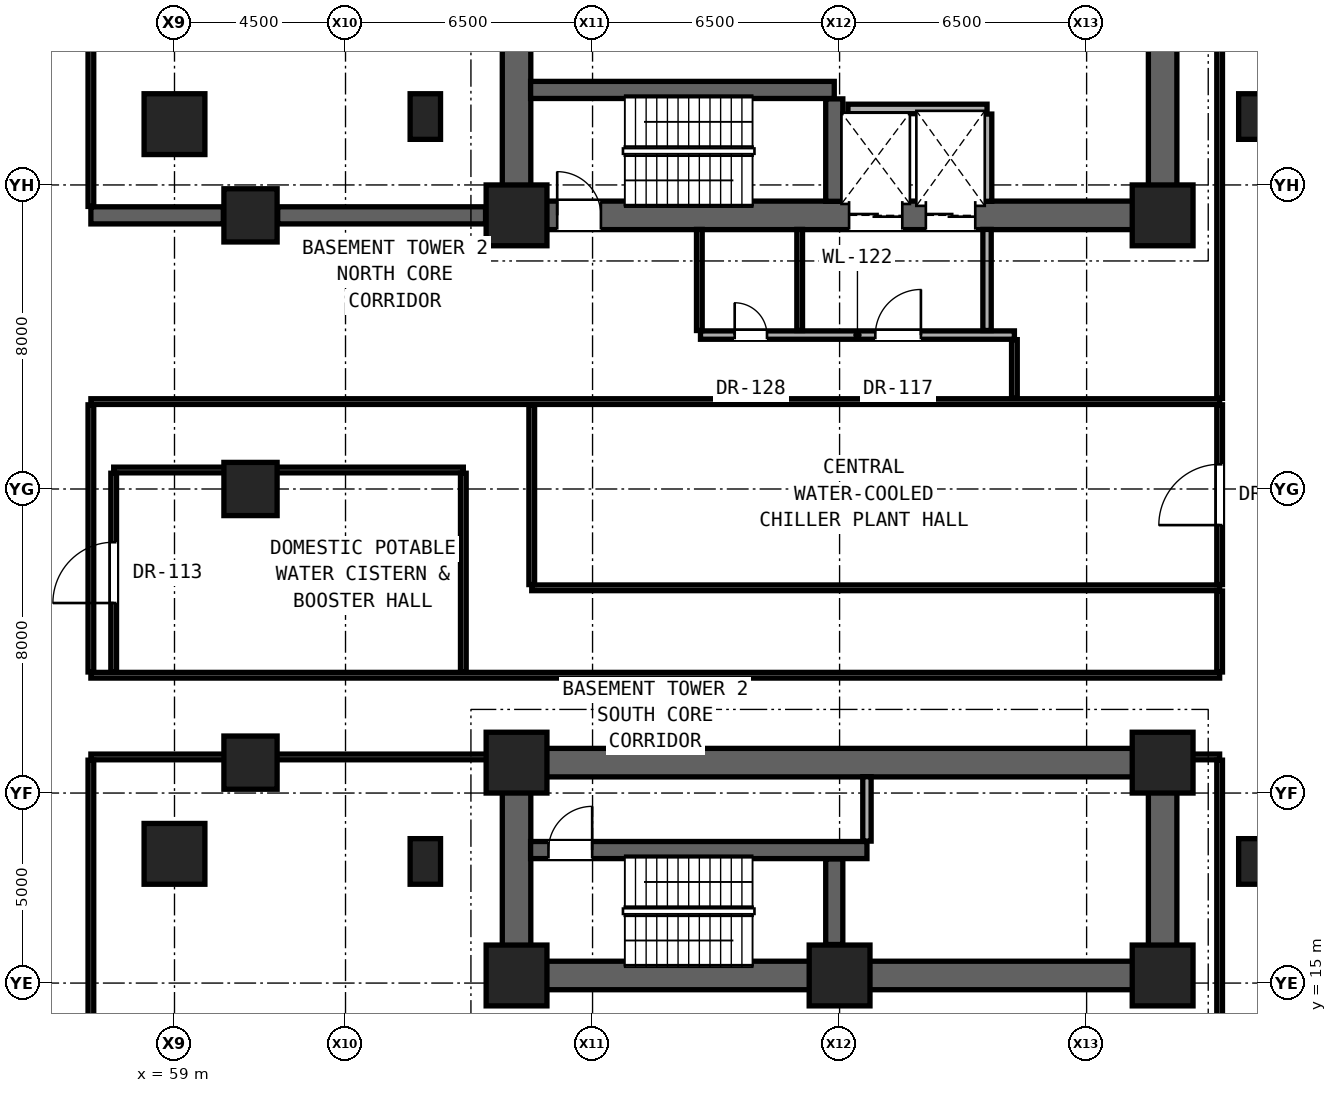
"""IFC4 building model, lengths in metres.
Left out: names, types, materials, properties, quantities, classifications, styles, units other than length and angle.
Written with IfcOpenShell. Run it as: python <this file> out.ifc"""

import sys

from ifc_helpers import new_model, si_unit, direction, frame, frame_2d, origin, origin_2d, place, context, subcontext, project, spatial, rectangle, hollow_rectangle, extrude, element, fill, save


model = new_model("IFC4")
c1 = context("Model", 3, precision=1e-05, world=origin(), true_north=direction((0.0, 1.0)))
c2 = subcontext(c1, "Body", "Model", "MODEL_VIEW")
j1 = project(units=[si_unit("LENGTHUNIT", "METRE"), si_unit("PLANEANGLEUNIT", "RADIAN")], contexts=[c1])
p1 = place(None, origin())
s1 = spatial("IfcSite", under=j1, at=p1, CompositionType="ELEMENT")
p2 = place(p1, origin())
s2 = spatial("IfcBuilding", under=s1, at=p2, CompositionType="ELEMENT")
p3 = place(p2, frame((0.0, 0.0, -4.8)))
s3 = spatial("IfcBuildingStorey", under=s2, at=p3, CompositionType="ELEMENT", Elevation=-4.8)
for number, where, z_axis, x_axis in (
    (1, (68.0, 15.2, 0.0), (0.0, 0.0, 1.0), (1.0, 0.0, 0.0)),
    (2, (76.5, 15.2, 0.0), (0.0, 0.0, 1.0), (1.0, 0.0, 0.0)),
    (3, (85.0, 15.2, 0.0), (0.0, 0.0, 1.0), (1.0, 0.0, 0.0)),
    (4, (68.0, 20.8, 0.0), (0.0, 0.0, 1.0), (1.0, 0.0, 0.0)),
    (5, (85.0, 20.8, 0.0), (0.0, 0.0, 1.0), (1.0, 0.0, 0.0)),
    (6, (68.0, 35.2, 0.0), (0.0, 0.0, 1.0), (1.0, 0.0, 0.0)),
    (7, (85.0, 35.2, 0.0), (0.0, 0.0, 1.0), (1.0, 0.0, 0.0)),
):
    element("IfcColumn", number, at=place(p3, frame(where, z_axis=z_axis, x_axis=x_axis)), inside=s3, PredefinedType="COLUMN", context=c2, shape_type="SweptSolid", body=[
        extrude(rectangle(XDim=1.6, YDim=1.6, at=origin_2d()), origin(), (0.0, 0.0, 1.0), 4.8),
    ])
for number, where, z_axis, x_axis in (
    (8, (61.0, 20.8, 0.0), (0.0, 0.0, 1.0), (1.0, 0.0, 0.0)),
    (9, (61.0, 28.0, 0.0), (0.0, 0.0, 1.0), (1.0, 0.0, 0.0)),
    (10, (61.0, 35.2, 0.0), (0.0, 0.0, 1.0), (1.0, 0.0, 0.0)),
):
    element("IfcColumn", number, at=place(p3, frame(where, z_axis=z_axis, x_axis=x_axis)), inside=s3, PredefinedType="COLUMN", context=c2, shape_type="SweptSolid", body=[
        extrude(hollow_rectangle(XDim=1.4, YDim=1.4, WallThickness=0.08, at=origin_2d()), origin(), (0.0, 0.0, 1.0), 4.8),
    ])
for number, where, z_axis, x_axis in (
    (11, (65.6, 18.2, 0.0), (0.0, 0.0, 1.0), (1.0, 0.0, 0.0)),
    (12, (87.4, 18.2, 0.0), (0.0, 0.0, 1.0), (1.0, 0.0, 0.0)),
    (13, (65.6, 37.8, 0.0), (0.0, 0.0, 1.0), (1.0, 0.0, 0.0)),
    (14, (87.4, 37.8, 0.0), (0.0, 0.0, 1.0), (1.0, 0.0, 0.0)),
):
    element("IfcColumn", number, at=place(p3, frame(where, z_axis=z_axis, x_axis=x_axis)), inside=s3, PredefinedType="PILASTER", context=c2, shape_type="SweptSolid", body=[
        extrude(rectangle(XDim=0.8, YDim=1.2, at=origin_2d()), origin(), (0.0, 0.0, 1.0), 4.8),
    ])
for number, where, z_axis, x_axis in (
    (15, (68.0, 35.2, 0.0), (0.0, 0.0, 1.0), (0.0, 1.0, 0.0)),
    (16, (85.0, 35.2, 0.0), (0.0, 0.0, 1.0), (0.0, 1.0, 0.0)),
):
    element("IfcWall", number, at=place(p3, frame(where, z_axis=z_axis, x_axis=x_axis)), inside=s3, PredefinedType="SHEAR", context=c2, shape_type="SweptSolid", body=[
        extrude(rectangle(XDim=5.6, YDim=0.75, at=frame_2d((2.8, 0.0))), origin(), (0.0, 0.0, 1.0), 4.48),
    ])
p4 = place(p3, frame((68.0, 35.2, 0.0), z_axis=(0.0, 0.0, 1.0), x_axis=(1.0, 0.0, 0.0)))
e17 = element("IfcWall", 17, at=p4, inside=s3, PredefinedType="SHEAR", context=c2, shape_type="SweptSolid", body=[
    extrude(rectangle(XDim=17.0, YDim=0.75, at=frame_2d((8.5, 0.0))), origin(), (0.0, 0.0, 1.0), 4.48),
])
p5 = place(p4, frame((1.07, 0.0, 0.0)))
e18 = element("IfcOpeningElement", 18, at=p5, cuts=e17, PredefinedType="OPENING", context=c2, shape_type="SweptSolid", body=[
    extrude(rectangle(XDim=1.15, YDim=2.2, at=frame_2d((0.575, 1.1))), frame((0.0, 0.385, 0.0), z_axis=(0.0, -1.0, 0.0), x_axis=(1.0, 0.0, 0.0)), (0.0, 0.0, 1.0), 0.77),
])
p6 = place(p4, frame((8.75, 0.0, 0.0)))
e19 = element("IfcOpeningElement", 19, at=p6, cuts=e17, PredefinedType="OPENING", context=c2, shape_type="SweptSolid", body=[
    extrude(rectangle(XDim=1.4, YDim=2.35, at=frame_2d((0.7, 1.175))), frame((0.0, 0.385, 0.0), z_axis=(0.0, -1.0, 0.0), x_axis=(1.0, 0.0, 0.0)), (0.0, 0.0, 1.0), 0.77),
])
p7 = place(p4, frame((10.77, 0.0, 0.0)))
e20 = element("IfcOpeningElement", 20, at=p7, cuts=e17, PredefinedType="OPENING", context=c2, shape_type="SweptSolid", body=[
    extrude(rectangle(XDim=1.3, YDim=2.3, at=frame_2d((0.65, 1.15))), frame((0.0, 0.385, 0.0), z_axis=(0.0, -1.0, 0.0), x_axis=(1.0, 0.0, 0.0)), (0.0, 0.0, 1.0), 0.77),
])
p8 = place(p3, frame((68.0, 15.2, 0.0), z_axis=(0.0, 0.0, 1.0), x_axis=(1.0, 0.0, 0.0)))
e21 = element("IfcWall", 21, at=p8, inside=s3, PredefinedType="SHEAR", context=c2, shape_type="SweptSolid", body=[
    extrude(rectangle(XDim=17.0, YDim=0.75, at=frame_2d((8.5, 0.0))), origin(), (0.0, 0.0, 1.0), 4.48),
])
for number, where, z_axis, x_axis in (
    (22, (68.0, 15.2, 0.0), (0.0, 0.0, 1.0), (0.0, 1.0, 0.0)),
    (23, (85.0, 15.2, 0.0), (0.0, 0.0, 1.0), (0.0, 1.0, 0.0)),
):
    element("IfcWall", number, at=place(p3, frame(where, z_axis=z_axis, x_axis=x_axis)), inside=s3, PredefinedType="SHEAR", context=c2, shape_type="SweptSolid", body=[
        extrude(rectangle(XDim=5.6, YDim=0.75, at=frame_2d((2.8, 0.0))), origin(), (0.0, 0.0, 1.0), 4.48),
    ])
p9 = place(p3, frame((68.0, 20.8, 0.0), z_axis=(0.0, 0.0, 1.0), x_axis=(1.0, 0.0, 0.0)))
e24 = element("IfcWall", 24, at=p9, inside=s3, PredefinedType="SHEAR", context=c2, shape_type="SweptSolid", body=[
    extrude(rectangle(XDim=17.0, YDim=0.75, at=frame_2d((8.5, 0.0))), origin(), (0.0, 0.0, 1.0), 4.48),
])
for number, where, z_axis, x_axis in (
    (25, (59.0, 18.4, 0.0), (0.0, 0.0, 1.0), (1.0, 0.0, 0.0)),
    (26, (59.0, 37.6, 0.0), (0.0, 0.0, 1.0), (1.0, 0.0, 0.0)),
):
    element("IfcColumn", number, at=place(p3, frame(where, z_axis=z_axis, x_axis=x_axis)), inside=s3, PredefinedType="COLUMN", context=c2, shape_type="SweptSolid", body=[
        extrude(rectangle(XDim=1.6, YDim=1.6, at=origin_2d()), origin(), (0.0, 0.0, 1.0), 4.8),
    ])
p10 = place(p3, frame((68.37, 18.5, 0.0), z_axis=(0.0, 0.0, 1.0), x_axis=(1.0, 0.0, 0.0)))
e27 = element("IfcWall", 27, at=p10, inside=s3, PredefinedType="SHEAR", context=c2, shape_type="SweptSolid", body=[
    extrude(rectangle(XDim=8.85, YDim=0.45, at=frame_2d((4.425, 0.0))), origin(), (0.0, 0.0, 1.0), 4.48),
])
p11 = place(p10, frame((0.47, 0.0, 0.0)))
e28 = element("IfcOpeningElement", 28, at=p11, cuts=e27, PredefinedType="OPENING", context=c2, shape_type="SweptSolid", body=[
    extrude(rectangle(XDim=1.15, YDim=2.2, at=frame_2d((0.575, 1.1))), frame((0.0, 0.235, 0.0), z_axis=(0.0, -1.0, 0.0), x_axis=(1.0, 0.0, 0.0)), (0.0, 0.0, 1.0), 0.47),
])
p12 = place(p3, frame((56.8, 20.95, 0.0), z_axis=(0.0, 0.0, 1.0), x_axis=(1.0, 0.0, 0.0)))
e29 = element("IfcWall", 29, at=p12, inside=s3, PredefinedType="PARTITIONING", context=c2, shape_type="SweptSolid", body=[
    extrude(rectangle(XDim=10.83, YDim=0.15, at=frame_2d((5.415, 0.0))), origin(), (0.0, 0.0, 1.0), 3.252),
])
p13 = place(p3, frame((85.37, 20.95, 0.0), z_axis=(0.0, 0.0, 1.0), x_axis=(1.0, 0.0, 0.0)))
e30 = element("IfcWall", 30, at=p13, inside=s3, PredefinedType="PARTITIONING", context=c2, shape_type="SweptSolid", body=[
    extrude(rectangle(XDim=1.13, YDim=0.15, at=frame_2d((0.565, 0.0))), origin(), (0.0, 0.0, 1.0), 3.372),
])
p14 = place(p3, frame((56.8, 23.1, 0.0), z_axis=(0.0, 0.0, 1.0), x_axis=(1.0, 0.0, 0.0)))
e31 = element("IfcWall", 31, at=p14, inside=s3, PredefinedType="PARTITIONING", context=c2, shape_type="SweptSolid", body=[
    extrude(rectangle(XDim=29.7, YDim=0.15, at=frame_2d((14.85, 0.0))), origin(), (0.0, 0.0, 1.0), 3.252),
])
p15 = place(p3, frame((68.4, 25.4, 0.0), z_axis=(0.0, 0.0, 1.0), x_axis=(1.0, 0.0, 0.0)))
e32 = element("IfcWall", 32, at=p15, inside=s3, PredefinedType="PARTITIONING", context=c2, shape_type="SweptSolid", body=[
    extrude(rectangle(XDim=18.1, YDim=0.15, at=frame_2d((9.05, 0.0))), origin(), (0.0, 0.0, 1.0), 3.545),
])
p16 = place(p3, frame((57.4, 28.5, 0.0), z_axis=(0.0, 0.0, 1.0), x_axis=(1.0, 0.0, 0.0)))
e33 = element("IfcWall", 33, at=p16, inside=s3, PredefinedType="PARTITIONING", context=c2, shape_type="SweptSolid", body=[
    extrude(rectangle(XDim=9.2, YDim=0.15, at=frame_2d((4.6, 0.0))), origin(), (0.0, 0.0, 1.0), 3.252),
])
p17 = place(p3, frame((56.8, 30.3, 0.0), z_axis=(0.0, 0.0, 1.0), x_axis=(1.0, 0.0, 0.0)))
e34 = element("IfcWall", 34, at=p17, inside=s3, PredefinedType="PARTITIONING", context=c2, shape_type="SweptSolid", body=[
    extrude(rectangle(XDim=29.7, YDim=0.15, at=frame_2d((14.85, 0.0))), origin(), (0.0, 0.0, 1.0), 3.252),
])
p18 = place(p3, frame((72.84, 32.05, 0.0), z_axis=(0.0, 0.0, 1.0), x_axis=(1.0, 0.0, 0.0)))
e35 = element("IfcWall", 35, at=p18, inside=s3, PredefinedType="SOLIDWALL", context=c2, shape_type="SweptSolid", body=[
    extrude(rectangle(XDim=8.26, YDim=0.22, at=frame_2d((4.13, 0.0))), origin(), (0.0, 0.0, 1.0), 4.009),
])
p19 = place(p18, frame((4.6, 0.0, 0.0)))
e36 = element("IfcOpeningElement", 36, at=p19, cuts=e35, PredefinedType="OPENING", context=c2, shape_type="SweptSolid", body=[
    extrude(rectangle(XDim=1.2, YDim=2.25, at=frame_2d((0.6, 1.125))), frame((0.0, 0.12, 0.0), z_axis=(0.0, -1.0, 0.0), x_axis=(1.0, 0.0, 0.0)), (0.0, 0.0, 1.0), 0.24),
])
p20 = place(p18, frame((0.9, 0.0, 0.0)))
e37 = element("IfcOpeningElement", 37, at=p20, cuts=e35, PredefinedType="OPENING", context=c2, shape_type="SweptSolid", body=[
    extrude(rectangle(XDim=0.85, YDim=2.01, at=frame_2d((0.425, 1.005))), frame((0.0, 0.12, 0.0), z_axis=(0.0, -1.0, 0.0), x_axis=(1.0, 0.0, 0.0)), (0.0, 0.0, 1.0), 0.24),
])
p21 = place(p3, frame((56.8, 35.2, 0.0), z_axis=(0.0, 0.0, 1.0), x_axis=(1.0, 0.0, 0.0)))
e38 = element("IfcWall", 38, at=p21, inside=s3, PredefinedType="SHEAR", context=c2, shape_type="SweptSolid", body=[
    extrude(rectangle(XDim=3.485, YDim=0.45, at=frame_2d((1.742, 0.0))), origin(), (0.0, 0.0, 1.0), 4.48),
])
p22 = place(p3, frame((61.715, 35.2, 0.0), z_axis=(0.0, 0.0, 1.0), x_axis=(1.0, 0.0, 0.0)))
e39 = element("IfcWall", 39, at=p22, inside=s3, PredefinedType="SHEAR", context=c2, shape_type="SweptSolid", body=[
    extrude(rectangle(XDim=5.47, YDim=0.45, at=frame_2d((2.735, 0.0))), origin(), (0.0, 0.0, 1.0), 4.48),
])
p23 = place(p3, frame((76.72, 38.0, 0.0), z_axis=(0.0, 0.0, 1.0), x_axis=(1.0, 0.0, 0.0)))
e40 = element("IfcWall", 40, at=p23, inside=s3, PredefinedType="SOLIDWALL", context=c2, shape_type="SweptSolid", body=[
    extrude(rectangle(XDim=3.66, YDim=0.25, at=frame_2d((1.83, 0.0))), origin(), (0.0, 0.0, 1.0), 4.3),
])
p24 = place(p3, frame((68.37, 38.5, 0.0), z_axis=(0.0, 0.0, 1.0), x_axis=(1.0, 0.0, 0.0)))
e41 = element("IfcWall", 41, at=p24, inside=s3, PredefinedType="SHEAR", context=c2, shape_type="SweptSolid", body=[
    extrude(rectangle(XDim=7.99, YDim=0.45, at=frame_2d((3.995, 0.0))), origin(), (0.0, 0.0, 1.0), 4.48),
])
p25 = place(p3, frame((56.8, 12.235, 0.0), z_axis=(0.0, 0.0, 1.0), x_axis=(0.0, 1.0, 0.0)))
e42 = element("IfcWall", 42, at=p25, inside=s3, PredefinedType="PARTITIONING", context=c2, shape_type="SweptSolid", body=[
    extrude(rectangle(XDim=8.63, YDim=0.15, at=frame_2d((4.315, 0.0))), origin(), (0.0, 0.0, 1.0), 3.252),
])
p26 = place(p3, frame((56.8, 23.185, 0.0), z_axis=(0.0, 0.0, 1.0), x_axis=(0.0, 1.0, 0.0)))
e43 = element("IfcWall", 43, at=p26, inside=s3, PredefinedType="PARTITIONING", context=c2, shape_type="SweptSolid", body=[
    extrude(rectangle(XDim=7.03, YDim=0.15, at=frame_2d((3.515, 0.0))), origin(), (0.0, 0.0, 1.0), 4.3),
])
p27 = place(p3, frame((56.8, 35.435, 0.0), z_axis=(0.0, 0.0, 1.0), x_axis=(0.0, 1.0, 0.0)))
e44 = element("IfcWall", 44, at=p27, inside=s3, PredefinedType="PARTITIONING", context=c2, shape_type="SweptSolid", body=[
    extrude(rectangle(XDim=11.615, YDim=0.15, at=frame_2d((5.808, 0.0))), origin(), (0.0, 0.0, 1.0), 3.252),
])
p28 = place(p3, frame((57.4, 23.185, 0.0), z_axis=(0.0, 0.0, 1.0), x_axis=(0.0, 1.0, 0.0)))
e45 = element("IfcWall", 45, at=p28, inside=s3, PredefinedType="PARTITIONING", context=c2, shape_type="SweptSolid", body=[
    extrude(rectangle(XDim=5.23, YDim=0.15, at=frame_2d((2.615, 0.0))), origin(), (0.0, 0.0, 1.0), 4.3),
])
p29 = place(p28, frame((1.815, 0.0, 0.0)))
e46 = element("IfcOpeningElement", 46, at=p29, cuts=e45, PredefinedType="OPENING", context=c2, shape_type="SweptSolid", body=[
    extrude(rectangle(XDim=1.6, YDim=2.3, at=frame_2d((0.8, 1.15))), frame((0.0, 0.085, 0.0), z_axis=(0.0, -1.0, 0.0), x_axis=(1.0, 0.0, 0.0)), (0.0, 0.0, 1.0), 0.17),
])
p30 = place(p3, frame((66.6, 23.185, 0.0), z_axis=(0.0, 0.0, 1.0), x_axis=(0.0, 1.0, 0.0)))
e47 = element("IfcWall", 47, at=p30, inside=s3, PredefinedType="PARTITIONING", context=c2, shape_type="SweptSolid", body=[
    extrude(rectangle(XDim=5.23, YDim=0.15, at=frame_2d((2.615, 0.0))), origin(), (0.0, 0.0, 1.0), 3.699),
])
p31 = place(p3, frame((68.4, 25.485, 0.0), z_axis=(0.0, 0.0, 1.0), x_axis=(0.0, 1.0, 0.0)))
e48 = element("IfcWall", 48, at=p31, inside=s3, PredefinedType="PARTITIONING", context=c2, shape_type="SweptSolid", body=[
    extrude(rectangle(XDim=4.73, YDim=0.15, at=frame_2d((2.365, 0.0))), origin(), (0.0, 0.0, 1.0), 3.545),
])
for number, where, z_axis, x_axis in (
    (49, (72.81, 32.17, 0.0), (0.0, 0.0, 1.0), (0.0, 1.0, 0.0)),
    (50, (75.45, 32.17, 0.0), (0.0, 0.0, 1.0), (0.0, 1.0, 0.0)),
):
    element("IfcWall", number, at=place(p3, frame(where, z_axis=z_axis, x_axis=x_axis)), inside=s3, PredefinedType="PARTITIONING", context=c2, shape_type="SweptSolid", body=[
        extrude(rectangle(XDim=2.66, YDim=0.15, at=frame_2d((1.33, 0.0))), origin(), (0.0, 0.0, 1.0), 4.3),
    ])
p32 = place(p3, frame((76.36, 16.015, 0.0), z_axis=(0.0, 0.0, 1.0), x_axis=(0.0, 1.0, 0.0)))
e51 = element("IfcWall", 51, at=p32, inside=s3, PredefinedType="SHEAR", context=c2, shape_type="SweptSolid", body=[
    extrude(rectangle(XDim=2.25, YDim=0.45, at=frame_2d((1.125, 0.0))), origin(), (0.0, 0.0, 1.0), 4.48),
])
p33 = place(p3, frame((76.36, 35.57, 0.0), z_axis=(0.0, 0.0, 1.0), x_axis=(0.0, 1.0, 0.0)))
e52 = element("IfcWall", 52, at=p33, inside=s3, PredefinedType="SHEAR", context=c2, shape_type="SweptSolid", body=[
    extrude(rectangle(XDim=2.695, YDim=0.45, at=frame_2d((1.347, 0.0))), origin(), (0.0, 0.0, 1.0), 4.48),
])
p34 = place(p3, frame((77.22, 18.735, 0.0), z_axis=(0.0, 0.0, 1.0), x_axis=(0.0, 1.0, 0.0)))
e53 = element("IfcWall", 53, at=p34, inside=s3, PredefinedType="SOLIDWALL", context=c2, shape_type="SweptSolid", body=[
    extrude(rectangle(XDim=1.695, YDim=0.22, at=frame_2d((0.847, 0.0))), origin(), (0.0, 0.0, 1.0), 4.3),
])
p35 = place(p3, frame((80.38, 32.17, 0.0), z_axis=(0.0, 0.0, 1.0), x_axis=(0.0, 1.0, 0.0)))
e54 = element("IfcWall", 54, at=p35, inside=s3, PredefinedType="SOLIDWALL", context=c2, shape_type="SweptSolid", body=[
    extrude(rectangle(XDim=2.66, YDim=0.22, at=frame_2d((1.33, 0.0))), origin(), (0.0, 0.0, 1.0), 4.3),
])
p36 = place(p3, frame((80.38, 35.57, 0.0), z_axis=(0.0, 0.0, 1.0), x_axis=(0.0, 1.0, 0.0)))
e55 = element("IfcWall", 55, at=p36, inside=s3, PredefinedType="SOLIDWALL", context=c2, shape_type="SweptSolid", body=[
    extrude(rectangle(XDim=2.295, YDim=0.25, at=frame_2d((1.147, 0.0))), origin(), (0.0, 0.0, 1.0), 4.3),
])
p37 = place(p3, frame((81.1, 30.385, 0.0), z_axis=(0.0, 0.0, 1.0), x_axis=(0.0, 1.0, 0.0)))
e56 = element("IfcWall", 56, at=p37, inside=s3, PredefinedType="PARTITIONING", context=c2, shape_type="SweptSolid", body=[
    extrude(rectangle(XDim=1.545, YDim=0.15, at=frame_2d((0.772, 0.0))), origin(), (0.0, 0.0, 1.0), 4.3),
])
p38 = place(p3, frame((86.5, 12.235, 0.0), z_axis=(0.0, 0.0, 1.0), x_axis=(0.0, 1.0, 0.0)))
e57 = element("IfcWall", 57, at=p38, inside=s3, PredefinedType="PARTITIONING", context=c2, shape_type="SweptSolid", body=[
    extrude(rectangle(XDim=8.63, YDim=0.15, at=frame_2d((4.315, 0.0))), origin(), (0.0, 0.0, 1.0), 3.372),
])
p39 = place(p3, frame((86.5, 23.185, 0.0), z_axis=(0.0, 0.0, 1.0), x_axis=(0.0, 1.0, 0.0)))
e58 = element("IfcWall", 58, at=p39, inside=s3, PredefinedType="PARTITIONING", context=c2, shape_type="SweptSolid", body=[
    extrude(rectangle(XDim=2.13, YDim=0.15, at=frame_2d((1.065, 0.0))), origin(), (0.0, 0.0, 1.0), 4.3),
])
p40 = place(p3, frame((86.5, 25.485, 0.0), z_axis=(0.0, 0.0, 1.0), x_axis=(0.0, 1.0, 0.0)))
e59 = element("IfcWall", 59, at=p40, inside=s3, PredefinedType="PARTITIONING", context=c2, shape_type="SweptSolid", body=[
    extrude(rectangle(XDim=4.73, YDim=0.15, at=frame_2d((2.365, 0.0))), origin(), (0.0, 0.0, 1.0), 3.699),
])
p41 = place(p40, frame((1.565, 0.0, 0.0)))
e60 = element("IfcOpeningElement", 60, at=p41, cuts=e59, PredefinedType="OPENING", context=c2, shape_type="SweptSolid", body=[
    extrude(rectangle(XDim=1.6, YDim=2.3, at=frame_2d((0.8, 1.15))), frame((0.0, 0.085, 0.0), z_axis=(0.0, -1.0, 0.0), x_axis=(1.0, 0.0, 0.0)), (0.0, 0.0, 1.0), 0.17),
])
p42 = place(p3, frame((86.5, 30.385, 0.0), z_axis=(0.0, 0.0, 1.0), x_axis=(0.0, 1.0, 0.0)))
e61 = element("IfcWall", 61, at=p42, inside=s3, PredefinedType="PARTITIONING", context=c2, shape_type="SweptSolid", body=[
    extrude(rectangle(XDim=16.665, YDim=0.15, at=frame_2d((8.333, 0.0))), origin(), (0.0, 0.0, 1.0), 3.372),
])
p43 = place(p5, origin())
e62 = element("IfcDoor", 62, at=p43, inside=s3, OperationType="SINGLE_SWING_LEFT", PredefinedType="DOOR", context=c2, shape_type="SweptSolid", body=[
    extrude(rectangle(XDim=1.15, YDim=2.2, at=frame_2d((0.575, 1.1))), frame((0.0, 0.025, 0.0), z_axis=(0.0, -1.0, 0.0), x_axis=(1.0, 0.0, 0.0)), (0.0, 0.0, 1.0), 0.05),
])
fill(e18, e62)
p44 = place(p19, origin())
e63 = element("IfcDoor", 63, at=p44, inside=s3, OperationType="SINGLE_SWING_RIGHT", PredefinedType="DOOR", context=c2, shape_type="SweptSolid", body=[
    extrude(rectangle(XDim=1.2, YDim=2.25, at=frame_2d((0.6, 1.125))), frame((0.0, 0.025, 0.0), z_axis=(0.0, -1.0, 0.0), x_axis=(1.0, 0.0, 0.0)), (0.0, 0.0, 1.0), 0.05),
])
fill(e36, e63)
p45 = place(p20, origin())
e64 = element("IfcDoor", 64, at=p45, inside=s3, OperationType="SINGLE_SWING_LEFT", PredefinedType="DOOR", context=c2, shape_type="SweptSolid", body=[
    extrude(rectangle(XDim=0.85, YDim=2.01, at=frame_2d((0.425, 1.005))), frame((0.0, 0.025, 0.0), z_axis=(0.0, -1.0, 0.0), x_axis=(1.0, 0.0, 0.0)), (0.0, 0.0, 1.0), 0.05),
])
fill(e37, e64)
p46 = place(p11, origin())
e65 = element("IfcDoor", 65, at=p46, inside=s3, OperationType="SINGLE_SWING_RIGHT", PredefinedType="DOOR", context=c2, shape_type="SweptSolid", body=[
    extrude(rectangle(XDim=1.15, YDim=2.2, at=frame_2d((0.575, 1.1))), frame((0.0, 0.025, 0.0), z_axis=(0.0, -1.0, 0.0), x_axis=(1.0, 0.0, 0.0)), (0.0, 0.0, 1.0), 0.05),
])
fill(e28, e65)
p47 = place(p41, origin())
e66 = element("IfcDoor", 66, at=p47, inside=s3, OperationType="SINGLE_SWING_LEFT", PredefinedType="DOOR", context=c2, shape_type="SweptSolid", body=[
    extrude(rectangle(XDim=1.6, YDim=2.3, at=frame_2d((0.8, 1.15))), frame((0.0, 0.025, 0.0), z_axis=(0.0, -1.0, 0.0), x_axis=(1.0, 0.0, 0.0)), (0.0, 0.0, 1.0), 0.05),
])
fill(e60, e66)
p48 = place(p29, origin())
e67 = element("IfcDoor", 67, at=p48, inside=s3, OperationType="SINGLE_SWING_LEFT", PredefinedType="DOOR", context=c2, shape_type="SweptSolid", body=[
    extrude(rectangle(XDim=1.6, YDim=2.3, at=frame_2d((0.8, 1.15))), frame((0.0, 0.025, 0.0), z_axis=(0.0, -1.0, 0.0), x_axis=(1.0, 0.0, 0.0)), (0.0, 0.0, 1.0), 0.05),
])
fill(e46, e67)
p49 = place(p6, origin())
e68 = element("IfcDoor", 68, at=p49, inside=s3, OperationType="DOUBLE_DOOR_SLIDING", PredefinedType="DOOR", context=c2, shape_type="SweptSolid", body=[
    extrude(rectangle(XDim=1.4, YDim=2.35, at=frame_2d((0.7, 1.175))), frame((0.0, 0.025, 0.0), z_axis=(0.0, -1.0, 0.0), x_axis=(1.0, 0.0, 0.0)), (0.0, 0.0, 1.0), 0.05),
])
fill(e19, e68)
p50 = place(p7, origin())
e69 = element("IfcDoor", 69, at=p50, inside=s3, OperationType="DOUBLE_DOOR_SLIDING", PredefinedType="DOOR", context=c2, shape_type="SweptSolid", body=[
    extrude(rectangle(XDim=1.3, YDim=2.3, at=frame_2d((0.65, 1.15))), frame((0.0, 0.025, 0.0), z_axis=(0.0, -1.0, 0.0), x_axis=(1.0, 0.0, 0.0)), (0.0, 0.0, 1.0), 0.05),
])
fill(e20, e69)
save(model, sys.argv[1])
